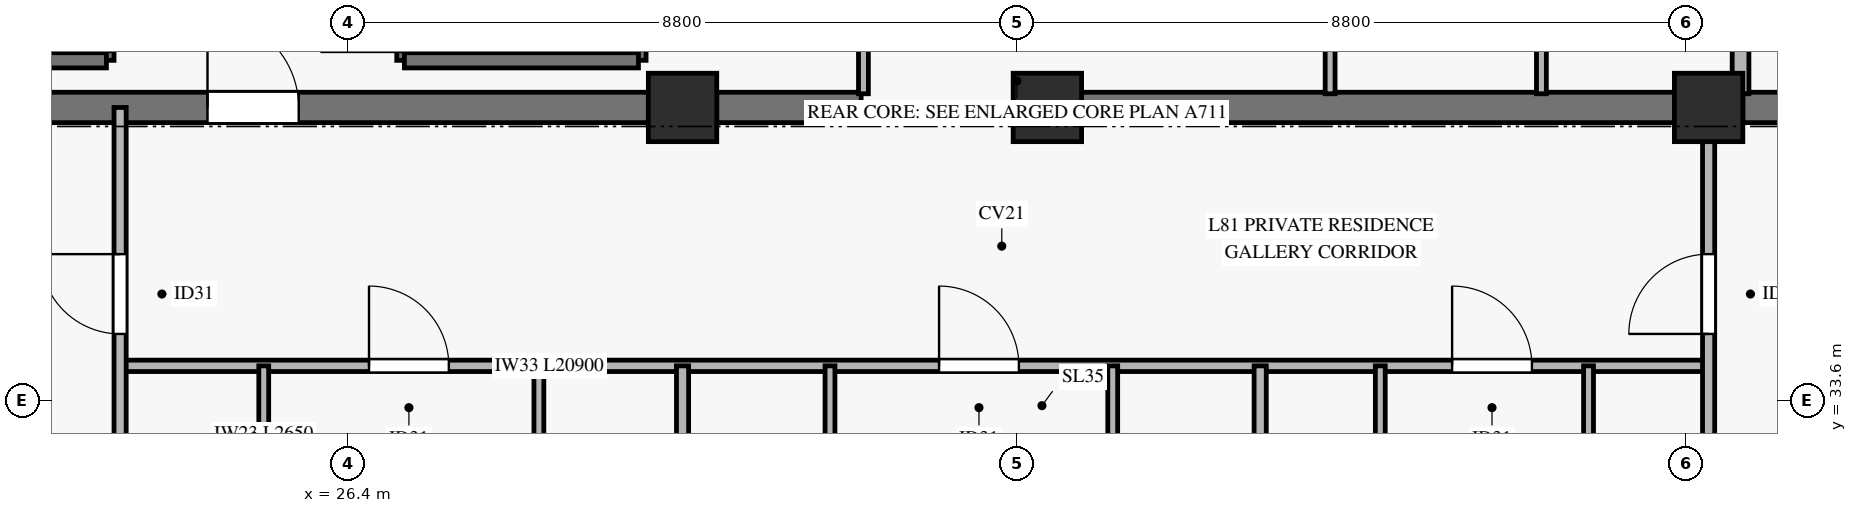
"""IFC4 building model, lengths in metres.
Left out: names, types, materials, properties, quantities, classifications, styles, units other than length and angle.
Written with IfcOpenShell. Run it as: python <this file> out.ifc"""

import sys

from ifc_helpers import new_model, si_unit, direction, frame, frame_2d, origin, origin_2d, place, context, subcontext, project, spatial, rectangle, extrude, source, transform, mapped, element, fill, save


model = new_model("IFC4")
c1 = context("Model", 3, precision=1e-05, world=origin(), true_north=direction((0.0, 1.0)))
c2 = subcontext(c1, "Body", "Model", "MODEL_VIEW")
j1 = project(units=[si_unit("LENGTHUNIT", "METRE"), si_unit("PLANEANGLEUNIT", "RADIAN")], contexts=[c1])
p1 = place(None, origin())
s1 = spatial("IfcSite", under=j1, at=p1, CompositionType="ELEMENT")
p2 = place(p1, origin())
s2 = spatial("IfcBuilding", under=s1, at=p2, CompositionType="ELEMENT")
p3 = place(p2, frame((0.0, 0.0, 314.2)))
s3 = spatial("IfcBuildingStorey", under=s2, at=p3, CompositionType="ELEMENT", Elevation=314.2)
m1 = source(origin(), c2, "Body", "SweptSolid", [
    extrude(rectangle(XDim=0.9, YDim=0.9, at=origin_2d()), origin(), (0.0, 0.0, 1.0), 3.185),
])
for number, where, z_axis, x_axis in (
    (1, (30.8, 37.45, 0.0), (0.0, 0.0, 1.0), (1.0, 0.0, 0.0)),
    (2, (35.6, 37.45, 0.0), (0.0, 0.0, 1.0), (1.0, 0.0, 0.0)),
    (3, (44.3, 37.45, 0.0), (0.0, 0.0, 1.0), (1.0, 0.0, 0.0)),
):
    element("IfcColumn", number, at=place(p3, frame(where, z_axis=z_axis, x_axis=x_axis)), inside=s3, PredefinedType="PILASTER", context=c2, shape_type="MappedRepresentation", body=[
        mapped(m1, transform((0.0, 0.0, 0.0), x_axis=(1.0, 0.0, 0.0), y_axis=(0.0, 1.0, 0.0), z_axis=(0.0, 0.0, 1.0), scale=1.0)),
    ])
p4 = place(p3, frame((20.3, 37.45, 0.0), z_axis=(0.0, 0.0, 1.0), x_axis=(1.0, 0.0, 0.0)))
e4 = element("IfcWall", 4, at=p4, inside=s3, PredefinedType="SHEAR", context=c2, shape_type="SweptSolid", body=[
    extrude(rectangle(XDim=10.05, YDim=0.4, at=frame_2d((5.025, 0.0))), origin(), (0.0, 0.0, 1.0), 3.185),
])
p5 = place(p4, frame((4.25, 0.0, 0.0)))
e5 = element("IfcOpeningElement", 5, at=p5, cuts=e4, PredefinedType="OPENING", context=c2, shape_type="SweptSolid", body=[
    extrude(rectangle(XDim=1.2, YDim=2.15, at=frame_2d((0.6, 1.075))), frame((0.0, 0.21, 0.0), z_axis=(0.0, -1.0, 0.0), x_axis=(1.0, 0.0, 0.0)), (0.0, 0.0, 1.0), 0.42),
])
p6 = place(p3, frame((31.25, 37.45, 0.0), z_axis=(0.0, 0.0, 1.0), x_axis=(1.0, 0.0, 0.0)))
e6 = element("IfcWall", 6, at=p6, inside=s3, PredefinedType="SHEAR", context=c2, shape_type="SweptSolid", body=[
    extrude(rectangle(XDim=1.9, YDim=0.4, at=frame_2d((0.95, 0.0))), origin(), (0.0, 0.0, 1.0), 3.185),
])
p7 = place(p3, frame((36.05, 37.45, 0.0), z_axis=(0.0, 0.0, 1.0), x_axis=(1.0, 0.0, 0.0)))
e7 = element("IfcWall", 7, at=p7, inside=s3, PredefinedType="SHEAR", context=c2, shape_type="SweptSolid", body=[
    extrude(rectangle(XDim=7.8, YDim=0.4, at=frame_2d((3.9, 0.0))), origin(), (0.0, 0.0, 1.0), 3.185),
])
p8 = place(p3, frame((44.75, 37.45, 0.0), z_axis=(0.0, 0.0, 1.0), x_axis=(1.0, 0.0, 0.0)))
e8 = element("IfcWall", 8, at=p8, inside=s3, PredefinedType="SHEAR", context=c2, shape_type="SweptSolid", body=[
    extrude(rectangle(XDim=5.35, YDim=0.4, at=frame_2d((2.675, 0.0))), origin(), (0.0, 0.0, 1.0), 3.185),
])
p9 = place(p8, frame((0.7, 0.0, 0.0)))
e9 = element("IfcOpeningElement", 9, at=p9, cuts=e8, PredefinedType="OPENING", context=c2, shape_type="SweptSolid", body=[
    extrude(rectangle(XDim=1.2, YDim=2.15, at=frame_2d((0.6, 1.075))), frame((0.0, 0.21, 0.0), z_axis=(0.0, -1.0, 0.0), x_axis=(1.0, 0.0, 0.0)), (0.0, 0.0, 1.0), 0.42),
])
p10 = place(p3, frame((23.22, 38.07, 0.0), z_axis=(0.0, 0.0, 1.0), x_axis=(0.0, 1.0, 0.0)))
e10 = element("IfcWall", 10, at=p10, inside=s3, PredefinedType="SOLIDWALL", context=c2, shape_type="SweptSolid", body=[
    extrude(rectangle(XDim=7.25, YDim=0.2, at=frame_2d((3.625, 0.0))), origin(), (0.0, 0.0, 1.0), 3.4),
])
p11 = place(p10, frame((0.11, 0.0, 0.0)))
e11 = element("IfcOpeningElement", 11, at=p11, cuts=e10, PredefinedType="OPENING", context=c2, shape_type="SweptSolid", body=[
    extrude(rectangle(XDim=1.1, YDim=2.15, at=frame_2d((0.55, 1.075))), frame((0.0, 0.11, 0.0), z_axis=(0.0, -1.0, 0.0), x_axis=(1.0, 0.0, 0.0)), (0.0, 0.0, 1.0), 0.22),
])
p12 = place(p3, frame((20.17, 38.07, 0.0), z_axis=(0.0, 0.0, 1.0), x_axis=(1.0, 0.0, 0.0)))
e12 = element("IfcWall", 12, at=p12, inside=s3, PredefinedType="SOLIDWALL", context=c2, shape_type="SweptSolid", body=[
    extrude(rectangle(XDim=3.05, YDim=0.2, at=frame_2d((1.525, 0.0))), origin(), (0.0, 0.0, 1.0), 3.4),
])
p13 = place(p3, frame((27.14, 38.07, 0.0), z_axis=(0.0, 0.0, 1.0), x_axis=(0.0, 1.0, 0.0)))
e13 = element("IfcWall", 13, at=p13, inside=s3, PredefinedType="SOLIDWALL", context=c2, shape_type="SweptSolid", body=[
    extrude(rectangle(XDim=7.25, YDim=0.2, at=frame_2d((3.625, 0.0))), origin(), (0.0, 0.0, 1.0), 3.4),
])
p14 = place(p13, frame((0.11, 0.0, 0.0)))
e14 = element("IfcOpeningElement", 14, at=p14, cuts=e13, PredefinedType="OPENING", context=c2, shape_type="SweptSolid", body=[
    extrude(rectangle(XDim=1.1, YDim=2.15, at=frame_2d((0.55, 1.075))), frame((0.0, 0.11, 0.0), z_axis=(0.0, -1.0, 0.0), x_axis=(1.0, 0.0, 0.0)), (0.0, 0.0, 1.0), 0.22),
])
p15 = place(p3, frame((30.22, 38.07, 0.0), z_axis=(0.0, 0.0, 1.0), x_axis=(0.0, 1.0, 0.0)))
e15 = element("IfcWall", 15, at=p15, inside=s3, PredefinedType="SOLIDWALL", context=c2, shape_type="SweptSolid", body=[
    extrude(rectangle(XDim=7.25, YDim=0.2, at=frame_2d((3.625, 0.0))), origin(), (0.0, 0.0, 1.0), 3.4),
])
p16 = place(p3, frame((27.14, 38.07, 0.0), z_axis=(0.0, 0.0, 1.0), x_axis=(1.0, 0.0, 0.0)))
e16 = element("IfcWall", 16, at=p16, inside=s3, PredefinedType="SOLIDWALL", context=c2, shape_type="SweptSolid", body=[
    extrude(rectangle(XDim=3.08, YDim=0.2, at=frame_2d((1.54, 0.0))), origin(), (0.0, 0.0, 1.0), 3.4),
])
p17 = place(p3, frame((44.72, 37.63, 0.0), z_axis=(0.0, 0.0, 1.0), x_axis=(0.0, 1.0, 0.0)))
e17 = element("IfcWall", 17, at=p17, inside=s3, PredefinedType="SOLIDWALL", context=c2, shape_type="SweptSolid", body=[
    extrude(rectangle(XDim=7.59, YDim=0.22, at=frame_2d((3.795, 0.0))), origin(), (0.0, 0.0, 1.0), 3.185),
])
p18 = place(p3, frame((33.18, 37.63, 0.0), z_axis=(0.0, 0.0, 1.0), x_axis=(0.0, 1.0, 0.0)))
e18 = element("IfcWall", 18, at=p18, inside=s3, PredefinedType="PARTITIONING", context=c2, shape_type="SweptSolid", body=[
    extrude(rectangle(XDim=6.52, YDim=0.13, at=frame_2d((3.26, 0.0))), origin(), (0.0, 0.0, 1.0), 2.27),
])
p19 = place(p18, frame((2.27, 0.0, 0.0)))
e19 = element("IfcOpeningElement", 19, at=p19, cuts=e18, PredefinedType="OPENING", context=c2, shape_type="SweptSolid", body=[
    extrude(rectangle(XDim=0.9, YDim=2.1, at=frame_2d((0.45, 1.05))), frame((0.0, 0.075, 0.0), z_axis=(0.0, -1.0, 0.0), x_axis=(1.0, 0.0, 0.0)), (0.0, 0.0, 1.0), 0.15),
])
p20 = place(p3, frame((39.32, 37.63, 0.0), z_axis=(0.0, 0.0, 1.0), x_axis=(0.0, 1.0, 0.0)))
e20 = element("IfcWall", 20, at=p20, inside=s3, PredefinedType="PARTITIONING", context=c2, shape_type="SweptSolid", body=[
    extrude(rectangle(XDim=8.74, YDim=0.13, at=frame_2d((4.37, 0.0))), origin(), (0.0, 0.0, 1.0), 3.185),
])
p21 = place(p20, frame((4.89, 0.0, 0.0)))
e21 = element("IfcOpeningElement", 21, at=p21, cuts=e20, PredefinedType="OPENING", context=c2, shape_type="SweptSolid", body=[
    extrude(rectangle(XDim=0.9, YDim=2.1, at=frame_2d((0.45, 1.05))), frame((0.0, 0.075, 0.0), z_axis=(0.0, -1.0, 0.0), x_axis=(1.0, 0.0, 0.0)), (0.0, 0.0, 1.0), 0.15),
])
p22 = place(p3, frame((42.1, 37.63, 0.0), z_axis=(0.0, 0.0, 1.0), x_axis=(0.0, 1.0, 0.0)))
e22 = element("IfcWall", 22, at=p22, inside=s3, PredefinedType="PARTITIONING", context=c2, shape_type="SweptSolid", body=[
    extrude(rectangle(XDim=8.74, YDim=0.13, at=frame_2d((4.37, 0.0))), origin(), (0.0, 0.0, 1.0), 3.185),
])
p23 = place(p22, frame((2.17, 0.0, 0.0)))
e23 = element("IfcOpeningElement", 23, at=p23, cuts=e22, PredefinedType="OPENING", context=c2, shape_type="SweptSolid", body=[
    extrude(rectangle(XDim=0.9, YDim=2.1, at=frame_2d((0.45, 1.05))), frame((0.0, 0.075, 0.0), z_axis=(0.0, -1.0, 0.0), x_axis=(1.0, 0.0, 0.0)), (0.0, 0.0, 1.0), 0.15),
])
p24 = place(p3, frame((23.4, 34.05, 0.0), z_axis=(0.0, 0.0, 1.0), x_axis=(1.0, 0.0, 0.0)))
e24 = element("IfcWall", 24, at=p24, inside=s3, PredefinedType="PARTITIONING", context=c2, shape_type="SweptSolid", body=[
    extrude(rectangle(XDim=20.9, YDim=0.15, at=frame_2d((10.45, 0.0))), origin(), (0.0, 0.0, 1.0), 2.47),
])
p25 = place(p24, frame((3.275, 0.0, 0.0)))
e25 = element("IfcOpeningElement", 25, at=p25, cuts=e24, PredefinedType="OPENING", context=c2, shape_type="SweptSolid", body=[
    extrude(rectangle(XDim=1.05, YDim=2.15, at=frame_2d((0.525, 1.075))), frame((0.0, 0.085, 0.0), z_axis=(0.0, -1.0, 0.0), x_axis=(1.0, 0.0, 0.0)), (0.0, 0.0, 1.0), 0.17),
])
p26 = place(p24, frame((10.775, 0.0, 0.0)))
e26 = element("IfcOpeningElement", 26, at=p26, cuts=e24, PredefinedType="OPENING", context=c2, shape_type="SweptSolid", body=[
    extrude(rectangle(XDim=1.05, YDim=2.15, at=frame_2d((0.525, 1.075))), frame((0.0, 0.085, 0.0), z_axis=(0.0, -1.0, 0.0), x_axis=(1.0, 0.0, 0.0)), (0.0, 0.0, 1.0), 0.17),
])
p27 = place(p24, frame((17.525, 0.0, 0.0)))
e27 = element("IfcOpeningElement", 27, at=p27, cuts=e24, PredefinedType="OPENING", context=c2, shape_type="SweptSolid", body=[
    extrude(rectangle(XDim=1.05, YDim=2.15, at=frame_2d((0.525, 1.075))), frame((0.0, 0.085, 0.0), z_axis=(0.0, -1.0, 0.0), x_axis=(1.0, 0.0, 0.0)), (0.0, 0.0, 1.0), 0.17),
])
p28 = place(p3, frame((23.4, 20.704, 0.0), z_axis=(0.0, 0.0, 1.0), x_axis=(0.0, 1.0, 0.0)))
e28 = element("IfcWall", 28, at=p28, inside=s3, PredefinedType="PARTITIONING", context=c2, shape_type="SweptSolid", body=[
    extrude(rectangle(XDim=16.746, YDim=0.16, at=frame_2d((8.373, 0.0))), origin(), (0.0, 0.0, 1.0), 2.77),
])
p29 = place(p28, frame((13.766, 0.0, 0.0)))
e29 = element("IfcOpeningElement", 29, at=p29, cuts=e28, PredefinedType="OPENING", context=c2, shape_type="SweptSolid", body=[
    extrude(rectangle(XDim=1.05, YDim=2.15, at=frame_2d((0.525, 1.075))), frame((0.0, 0.09, 0.0), z_axis=(0.0, -1.0, 0.0), x_axis=(1.0, 0.0, 0.0)), (0.0, 0.0, 1.0), 0.18),
])
p30 = place(p3, frame((30.8, 20.704, 0.0), z_axis=(0.0, 0.0, 1.0), x_axis=(0.0, 1.0, 0.0)))
e30 = element("IfcWall", 30, at=p30, inside=s3, PredefinedType="PARTITIONING", context=c2, shape_type="SweptSolid", body=[
    extrude(rectangle(XDim=13.346, YDim=0.16, at=frame_2d((6.673, 0.0))), origin(), (0.0, 0.0, 1.0), 2.47),
])
p31 = place(p3, frame((38.4, 20.704, 0.0), z_axis=(0.0, 0.0, 1.0), x_axis=(0.0, 1.0, 0.0)))
e31 = element("IfcWall", 31, at=p31, inside=s3, PredefinedType="PARTITIONING", context=c2, shape_type="SweptSolid", body=[
    extrude(rectangle(XDim=13.346, YDim=0.16, at=frame_2d((6.673, 0.0))), origin(), (0.0, 0.0, 1.0), 2.77),
])
p32 = place(p3, frame((44.3, 20.704, 0.0), z_axis=(0.0, 0.0, 1.0), x_axis=(0.0, 1.0, 0.0)))
e32 = element("IfcWall", 32, at=p32, inside=s3, PredefinedType="PARTITIONING", context=c2, shape_type="SweptSolid", body=[
    extrude(rectangle(XDim=16.746, YDim=0.16, at=frame_2d((8.373, 0.0))), origin(), (0.0, 0.0, 1.0), 2.47),
])
p33 = place(p32, frame((13.766, 0.0, 0.0)))
e33 = element("IfcOpeningElement", 33, at=p33, cuts=e32, PredefinedType="OPENING", context=c2, shape_type="SweptSolid", body=[
    extrude(rectangle(XDim=1.05, YDim=2.15, at=frame_2d((0.525, 1.075))), frame((0.0, 0.09, 0.0), z_axis=(0.0, -1.0, 0.0), x_axis=(1.0, 0.0, 0.0)), (0.0, 0.0, 1.0), 0.18),
])
p34 = place(p3, frame((25.29, 31.4, 0.0), z_axis=(0.0, 0.0, 1.0), x_axis=(0.0, 1.0, 0.0)))
e34 = element("IfcWall", 34, at=p34, inside=s3, PredefinedType="PARTITIONING", context=c2, shape_type="SweptSolid", body=[
    extrude(rectangle(XDim=2.65, YDim=0.13, at=frame_2d((1.325, 0.0))), origin(), (0.0, 0.0, 1.0), 2.77),
])
p35 = place(p3, frame((28.91, 31.4, 0.0), z_axis=(0.0, 0.0, 1.0), x_axis=(0.0, 1.0, 0.0)))
e35 = element("IfcWall", 35, at=p35, inside=s3, PredefinedType="PARTITIONING", context=c2, shape_type="SweptSolid", body=[
    extrude(rectangle(XDim=2.65, YDim=0.13, at=frame_2d((1.325, 0.0))), origin(), (0.0, 0.0, 1.0), 2.77),
])
p36 = place(p35, frame((0.67, 0.0, 0.0)))
e36 = element("IfcOpeningElement", 36, at=p36, cuts=e35, PredefinedType="OPENING", context=c2, shape_type="SweptSolid", body=[
    extrude(rectangle(XDim=0.9, YDim=2.1, at=frame_2d((0.45, 1.05))), frame((0.0, 0.075, 0.0), z_axis=(0.0, -1.0, 0.0), x_axis=(1.0, 0.0, 0.0)), (0.0, 0.0, 1.0), 0.15),
])
p37 = place(p3, frame((32.74, 31.4, 0.0), z_axis=(0.0, 0.0, 1.0), x_axis=(0.0, 1.0, 0.0)))
e37 = element("IfcWall", 37, at=p37, inside=s3, PredefinedType="PARTITIONING", context=c2, shape_type="SweptSolid", body=[
    extrude(rectangle(XDim=2.65, YDim=0.13, at=frame_2d((1.325, 0.0))), origin(), (0.0, 0.0, 1.0), 2.77),
])
p38 = place(p3, frame((36.46, 31.4, 0.0), z_axis=(0.0, 0.0, 1.0), x_axis=(0.0, 1.0, 0.0)))
e38 = element("IfcWall", 38, at=p38, inside=s3, PredefinedType="PARTITIONING", context=c2, shape_type="SweptSolid", body=[
    extrude(rectangle(XDim=2.65, YDim=0.13, at=frame_2d((1.325, 0.0))), origin(), (0.0, 0.0, 1.0), 2.77),
])
p39 = place(p38, frame((0.67, 0.0, 0.0)))
e39 = element("IfcOpeningElement", 39, at=p39, cuts=e38, PredefinedType="OPENING", context=c2, shape_type="SweptSolid", body=[
    extrude(rectangle(XDim=0.9, YDim=2.1, at=frame_2d((0.45, 1.05))), frame((0.0, 0.075, 0.0), z_axis=(0.0, -1.0, 0.0), x_axis=(1.0, 0.0, 0.0)), (0.0, 0.0, 1.0), 0.15),
])
p40 = place(p3, frame((39.98, 31.4, 0.0), z_axis=(0.0, 0.0, 1.0), x_axis=(0.0, 1.0, 0.0)))
e40 = element("IfcWall", 40, at=p40, inside=s3, PredefinedType="PARTITIONING", context=c2, shape_type="SweptSolid", body=[
    extrude(rectangle(XDim=2.65, YDim=0.13, at=frame_2d((1.325, 0.0))), origin(), (0.0, 0.0, 1.0), 2.77),
])
p41 = place(p3, frame((42.72, 31.4, 0.0), z_axis=(0.0, 0.0, 1.0), x_axis=(0.0, 1.0, 0.0)))
e41 = element("IfcWall", 41, at=p41, inside=s3, PredefinedType="PARTITIONING", context=c2, shape_type="SweptSolid", body=[
    extrude(rectangle(XDim=2.65, YDim=0.13, at=frame_2d((1.325, 0.0))), origin(), (0.0, 0.0, 1.0), 2.77),
])
p42 = place(p41, frame((0.67, 0.0, 0.0)))
e42 = element("IfcOpeningElement", 42, at=p42, cuts=e41, PredefinedType="OPENING", context=c2, shape_type="SweptSolid", body=[
    extrude(rectangle(XDim=0.9, YDim=2.1, at=frame_2d((0.45, 1.05))), frame((0.0, 0.075, 0.0), z_axis=(0.0, -1.0, 0.0), x_axis=(1.0, 0.0, 0.0)), (0.0, 0.0, 1.0), 0.15),
])
m2 = source(origin(), c2, "Body", "SweptSolid", [
    extrude(rectangle(XDim=1.2, YDim=2.15, at=frame_2d((0.6, 1.075))), frame((0.0, 0.025, 0.0), z_axis=(0.0, -1.0, 0.0), x_axis=(1.0, 0.0, 0.0)), (0.0, 0.0, 1.0), 0.05),
])
p43 = place(p5, origin())
e43 = element("IfcDoor", 43, at=p43, inside=s3, OperationType="SINGLE_SWING_LEFT", PredefinedType="DOOR", context=c2, shape_type="MappedRepresentation", body=[
    mapped(m2, transform((0.0, 0.0, 0.0), x_axis=(1.0, 0.0, 0.0), y_axis=(0.0, 1.0, 0.0), z_axis=(0.0, 0.0, 1.0), scale=1.0)),
])
fill(e5, e43)
m3 = source(origin(), c2, "Body", "SweptSolid", [
    extrude(rectangle(XDim=1.05, YDim=2.15, at=frame_2d((0.525, 1.075))), frame((0.0, 0.025, 0.0), z_axis=(0.0, -1.0, 0.0), x_axis=(1.0, 0.0, 0.0)), (0.0, 0.0, 1.0), 0.05),
])
p44 = place(p29, origin())
e44 = element("IfcDoor", 44, at=p44, inside=s3, OperationType="SINGLE_SWING_RIGHT", PredefinedType="DOOR", context=c2, shape_type="MappedRepresentation", body=[
    mapped(m3, transform((0.0, 0.0, 0.0), x_axis=(1.0, 0.0, 0.0), y_axis=(0.0, 1.0, 0.0), z_axis=(0.0, 0.0, 1.0), scale=1.0)),
])
fill(e29, e44)
p45 = place(p25, origin())
e45 = element("IfcDoor", 45, at=p45, inside=s3, OperationType="SINGLE_SWING_LEFT", PredefinedType="DOOR", context=c2, shape_type="MappedRepresentation", body=[
    mapped(m3, transform((0.0, 0.0, 0.0), x_axis=(1.0, 0.0, 0.0), y_axis=(0.0, 1.0, 0.0), z_axis=(0.0, 0.0, 1.0), scale=1.0)),
])
fill(e25, e45)
p46 = place(p26, origin())
e46 = element("IfcDoor", 46, at=p46, inside=s3, OperationType="SINGLE_SWING_LEFT", PredefinedType="DOOR", context=c2, shape_type="MappedRepresentation", body=[
    mapped(m3, transform((0.0, 0.0, 0.0), x_axis=(1.0, 0.0, 0.0), y_axis=(0.0, 1.0, 0.0), z_axis=(0.0, 0.0, 1.0), scale=1.0)),
])
fill(e26, e46)
p47 = place(p27, origin())
e47 = element("IfcDoor", 47, at=p47, inside=s3, OperationType="SINGLE_SWING_LEFT", PredefinedType="DOOR", context=c2, shape_type="MappedRepresentation", body=[
    mapped(m3, transform((0.0, 0.0, 0.0), x_axis=(1.0, 0.0, 0.0), y_axis=(0.0, 1.0, 0.0), z_axis=(0.0, 0.0, 1.0), scale=1.0)),
])
fill(e27, e47)
p48 = place(p33, origin())
e48 = element("IfcDoor", 48, at=p48, inside=s3, OperationType="SINGLE_SWING_LEFT", PredefinedType="DOOR", context=c2, shape_type="MappedRepresentation", body=[
    mapped(m3, transform((0.0, 0.0, 0.0), x_axis=(1.0, 0.0, 0.0), y_axis=(0.0, 1.0, 0.0), z_axis=(0.0, 0.0, 1.0), scale=1.0)),
])
fill(e33, e48)
save(model, sys.argv[1])
